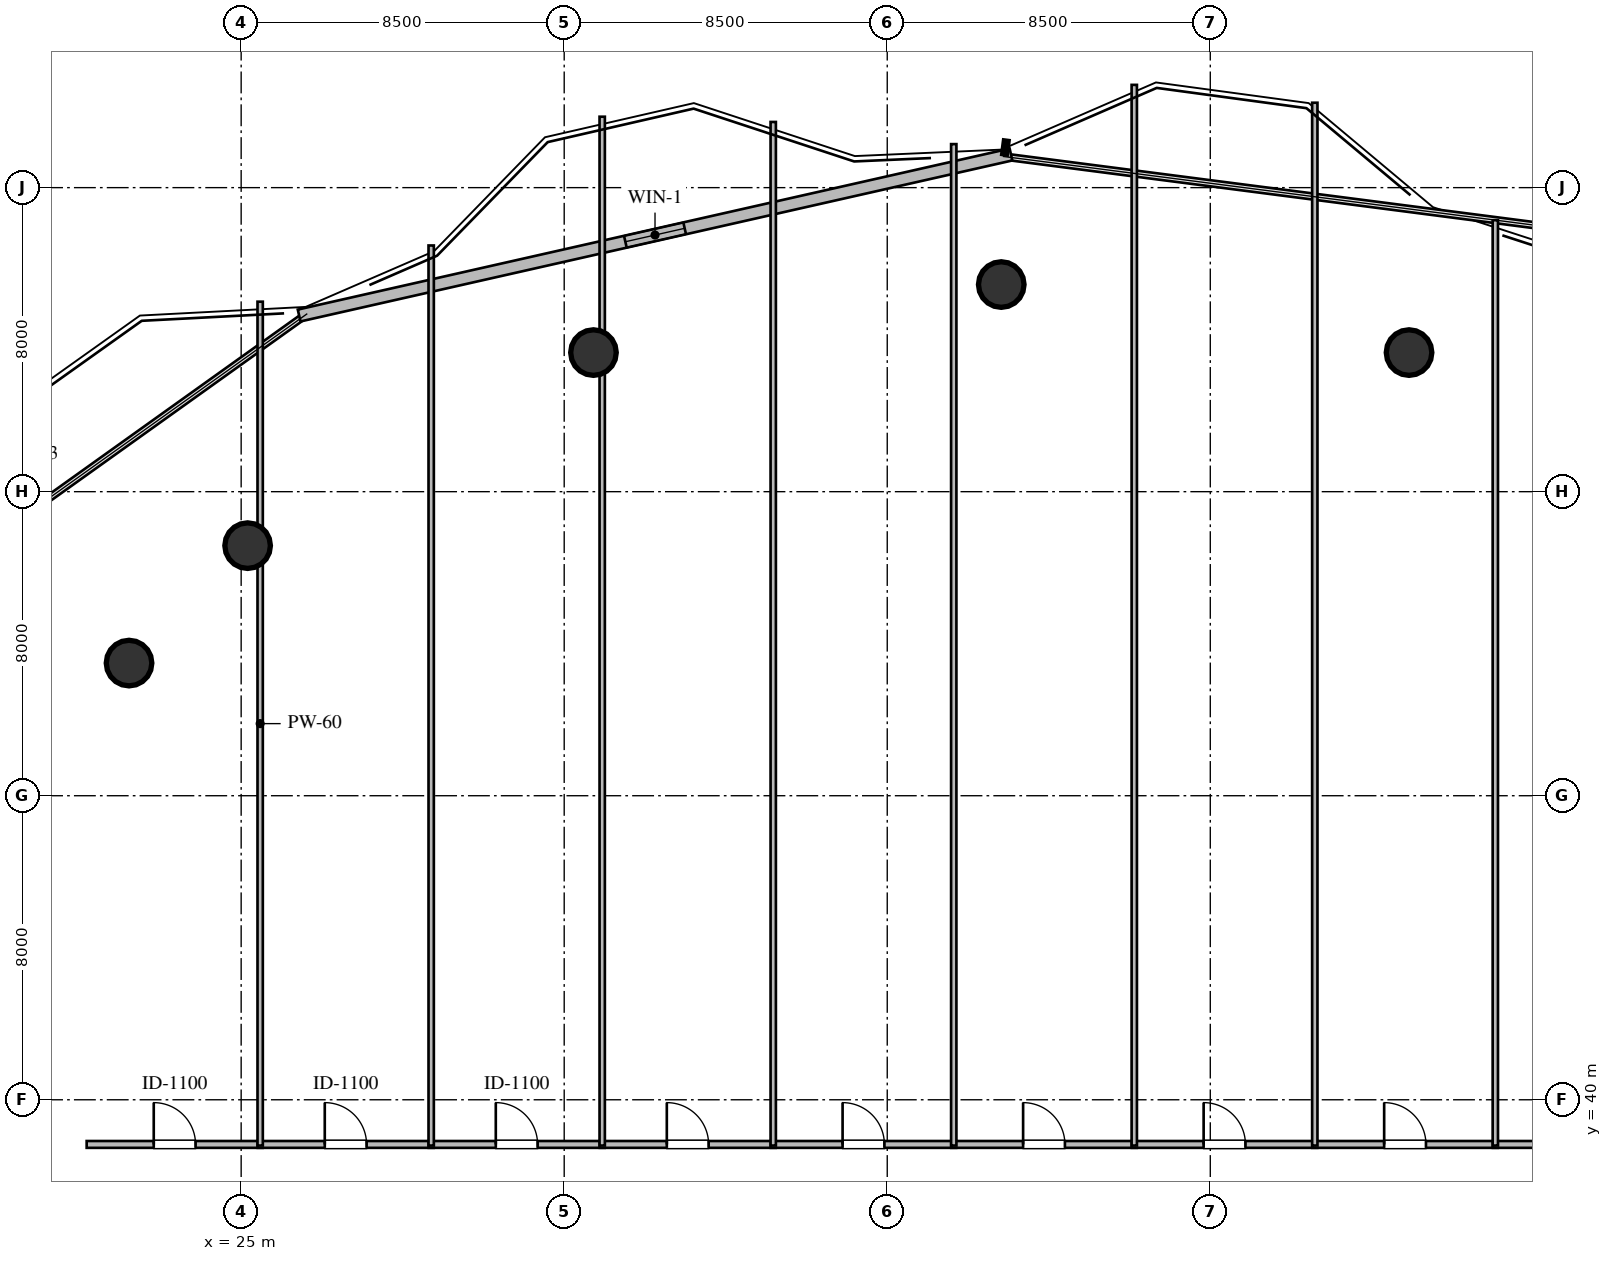
"""IFC4 building model, lengths in metres.
Left out: names, types, materials, properties, quantities, classifications, styles, units other than length and angle.
Written with IfcOpenShell. Run it as: python <this file> out.ifc"""

import sys

from ifc_helpers import new_model, si_unit, direction, frame, frame_2d, origin, origin_2d, place, context, subcontext, project, spatial, rectangle, circle, extrude, element, fill, save


model = new_model("IFC4")
c1 = context("Model", 3, precision=1e-05, world=origin(), true_north=direction((0.0, 1.0)))
c2 = subcontext(c1, "Body", "Model", "MODEL_VIEW")
j1 = project(units=[si_unit("LENGTHUNIT", "METRE"), si_unit("PLANEANGLEUNIT", "RADIAN")], contexts=[c1])
p1 = place(None, origin())
s1 = spatial("IfcSite", under=j1, at=p1, CompositionType="ELEMENT")
p2 = place(p1, origin())
s2 = spatial("IfcBuilding", under=s1, at=p2, CompositionType="ELEMENT")
p3 = place(p2, frame((0.0, 0.0, 178.2)))
s3 = spatial("IfcBuildingStorey", under=s2, at=p3, CompositionType="ELEMENT", Elevation=178.2)
for number, where, z_axis, x_axis in (
    (1, (55.73, 59.66, 0.0), (0.0, 0.0, 1.0), (1.0, 0.0, 0.0)),
    (2, (45.0, 61.45, 0.0), (0.0, 0.0, 1.0), (1.0, 0.0, 0.0)),
    (3, (34.27, 59.66, 0.0), (0.0, 0.0, 1.0), (1.0, 0.0, 0.0)),
    (4, (25.17, 54.58, 0.0), (0.0, 0.0, 1.0), (1.0, 0.0, 0.0)),
    (5, (22.05, 51.49, 0.0), (0.0, 0.0, 1.0), (1.0, 0.0, 0.0)),
):
    element("IfcColumn", number, at=place(p3, frame(where, z_axis=z_axis, x_axis=x_axis)), inside=s3, PredefinedType="COLUMN", context=c2, shape_type="SweptSolid", body=[
        extrude(circle(Radius=0.6, at=origin_2d()), origin(), (0.0, 0.0, 1.0), 3.6),
    ])
p4 = place(p3, frame((26.525, 60.635, 0.0), z_axis=(0.0, 0.0, 1.0), x_axis=(0.975368700272, 0.220580820855, 0.0)))
e6 = element("IfcWall", 6, at=p4, inside=s3, PredefinedType="STANDARD", context=c2, shape_type="SweptSolid", body=[
    extrude(rectangle(XDim=19.204, YDim=0.32, at=frame_2d((9.602, 0.0))), origin(), (0.0, 0.0, 1.0), 3.28),
])
p5 = place(p4, frame((8.801, 0.0, 1.05)))
e7 = element("IfcOpeningElement", 7, at=p5, cuts=e6, PredefinedType="OPENING", context=c2, shape_type="SweptSolid", body=[
    extrude(rectangle(XDim=1.6, YDim=1.5, at=frame_2d((0.8, 0.75))), frame((0.0, 0.17, 0.0), z_axis=(0.0, -1.0, 0.0), x_axis=(1.0, 0.0, 0.0)), (0.0, 0.0, 1.0), 0.34),
])
p6 = place(p3, frame((20.935, 38.825, 0.0), z_axis=(0.0, 0.0, 1.0), x_axis=(1.0, 0.0, 0.0)))
e8 = element("IfcWall", 8, at=p6, inside=s3, PredefinedType="PARTITIONING", context=c2, shape_type="SweptSolid", body=[
    extrude(rectangle(XDim=4.63, YDim=0.18, at=frame_2d((2.315, 0.0))), origin(), (0.0, 0.0, 1.0), 3.28),
])
p7 = place(p6, frame((1.765, 0.0, 0.0)))
e9 = element("IfcOpeningElement", 9, at=p7, cuts=e8, PredefinedType="OPENING", context=c2, shape_type="SweptSolid", body=[
    extrude(rectangle(XDim=1.1, YDim=2.1, at=frame_2d((0.55, 1.05))), frame((0.0, 0.1, 0.0), z_axis=(0.0, -1.0, 0.0), x_axis=(1.0, 0.0, 0.0)), (0.0, 0.0, 1.0), 0.2),
])
p8 = place(p3, frame((25.435, 38.825, 0.0), z_axis=(0.0, 0.0, 1.0), x_axis=(1.0, 0.0, 0.0)))
e10 = element("IfcWall", 10, at=p8, inside=s3, PredefinedType="PARTITIONING", context=c2, shape_type="SweptSolid", body=[
    extrude(rectangle(XDim=4.63, YDim=0.18, at=frame_2d((2.315, 0.0))), origin(), (0.0, 0.0, 1.0), 3.28),
])
p9 = place(p8, frame((1.765, 0.0, 0.0)))
e11 = element("IfcOpeningElement", 11, at=p9, cuts=e10, PredefinedType="OPENING", context=c2, shape_type="SweptSolid", body=[
    extrude(rectangle(XDim=1.1, YDim=2.1, at=frame_2d((0.55, 1.05))), frame((0.0, 0.1, 0.0), z_axis=(0.0, -1.0, 0.0), x_axis=(1.0, 0.0, 0.0)), (0.0, 0.0, 1.0), 0.2),
])
p10 = place(p3, frame((29.935, 38.825, 0.0), z_axis=(0.0, 0.0, 1.0), x_axis=(1.0, 0.0, 0.0)))
e12 = element("IfcWall", 12, at=p10, inside=s3, PredefinedType="PARTITIONING", context=c2, shape_type="SweptSolid", body=[
    extrude(rectangle(XDim=4.63, YDim=0.18, at=frame_2d((2.315, 0.0))), origin(), (0.0, 0.0, 1.0), 3.28),
])
p11 = place(p10, frame((1.765, 0.0, 0.0)))
e13 = element("IfcOpeningElement", 13, at=p11, cuts=e12, PredefinedType="OPENING", context=c2, shape_type="SweptSolid", body=[
    extrude(rectangle(XDim=1.1, YDim=2.1, at=frame_2d((0.55, 1.05))), frame((0.0, 0.1, 0.0), z_axis=(0.0, -1.0, 0.0), x_axis=(1.0, 0.0, 0.0)), (0.0, 0.0, 1.0), 0.2),
])
p12 = place(p3, frame((34.435, 38.825, 0.0), z_axis=(0.0, 0.0, 1.0), x_axis=(1.0, 0.0, 0.0)))
e14 = element("IfcWall", 14, at=p12, inside=s3, PredefinedType="PARTITIONING", context=c2, shape_type="SweptSolid", body=[
    extrude(rectangle(XDim=4.63, YDim=0.18, at=frame_2d((2.315, 0.0))), origin(), (0.0, 0.0, 1.0), 3.28),
])
p13 = place(p12, frame((1.765, 0.0, 0.0)))
e15 = element("IfcOpeningElement", 15, at=p13, cuts=e14, PredefinedType="OPENING", context=c2, shape_type="SweptSolid", body=[
    extrude(rectangle(XDim=1.1, YDim=2.1, at=frame_2d((0.55, 1.05))), frame((0.0, 0.1, 0.0), z_axis=(0.0, -1.0, 0.0), x_axis=(1.0, 0.0, 0.0)), (0.0, 0.0, 1.0), 0.2),
])
p14 = place(p3, frame((38.935, 38.825, 0.0), z_axis=(0.0, 0.0, 1.0), x_axis=(1.0, 0.0, 0.0)))
e16 = element("IfcWall", 16, at=p14, inside=s3, PredefinedType="PARTITIONING", context=c2, shape_type="SweptSolid", body=[
    extrude(rectangle(XDim=4.88, YDim=0.18, at=frame_2d((2.44, 0.0))), origin(), (0.0, 0.0, 1.0), 3.28),
])
p15 = place(p14, frame((1.89, 0.0, 0.0)))
e17 = element("IfcOpeningElement", 17, at=p15, cuts=e16, PredefinedType="OPENING", context=c2, shape_type="SweptSolid", body=[
    extrude(rectangle(XDim=1.1, YDim=2.1, at=frame_2d((0.55, 1.05))), frame((0.0, 0.1, 0.0), z_axis=(0.0, -1.0, 0.0), x_axis=(1.0, 0.0, 0.0)), (0.0, 0.0, 1.0), 0.2),
])
p16 = place(p3, frame((43.685, 38.825, 0.0), z_axis=(0.0, 0.0, 1.0), x_axis=(1.0, 0.0, 0.0)))
e18 = element("IfcWall", 18, at=p16, inside=s3, PredefinedType="PARTITIONING", context=c2, shape_type="SweptSolid", body=[
    extrude(rectangle(XDim=4.88, YDim=0.18, at=frame_2d((2.44, 0.0))), origin(), (0.0, 0.0, 1.0), 3.28),
])
p17 = place(p16, frame((1.89, 0.0, 0.0)))
e19 = element("IfcOpeningElement", 19, at=p17, cuts=e18, PredefinedType="OPENING", context=c2, shape_type="SweptSolid", body=[
    extrude(rectangle(XDim=1.1, YDim=2.1, at=frame_2d((0.55, 1.05))), frame((0.0, 0.1, 0.0), z_axis=(0.0, -1.0, 0.0), x_axis=(1.0, 0.0, 0.0)), (0.0, 0.0, 1.0), 0.2),
])
p18 = place(p3, frame((48.435, 38.825, 0.0), z_axis=(0.0, 0.0, 1.0), x_axis=(1.0, 0.0, 0.0)))
e20 = element("IfcWall", 20, at=p18, inside=s3, PredefinedType="PARTITIONING", context=c2, shape_type="SweptSolid", body=[
    extrude(rectangle(XDim=4.88, YDim=0.18, at=frame_2d((2.44, 0.0))), origin(), (0.0, 0.0, 1.0), 3.28),
])
p19 = place(p18, frame((1.89, 0.0, 0.0)))
e21 = element("IfcOpeningElement", 21, at=p19, cuts=e20, PredefinedType="OPENING", context=c2, shape_type="SweptSolid", body=[
    extrude(rectangle(XDim=1.1, YDim=2.1, at=frame_2d((0.55, 1.05))), frame((0.0, 0.1, 0.0), z_axis=(0.0, -1.0, 0.0), x_axis=(1.0, 0.0, 0.0)), (0.0, 0.0, 1.0), 0.2),
])
p20 = place(p3, frame((53.185, 38.825, 0.0), z_axis=(0.0, 0.0, 1.0), x_axis=(1.0, 0.0, 0.0)))
e22 = element("IfcWall", 22, at=p20, inside=s3, PredefinedType="PARTITIONING", context=c2, shape_type="SweptSolid", body=[
    extrude(rectangle(XDim=4.88, YDim=0.18, at=frame_2d((2.44, 0.0))), origin(), (0.0, 0.0, 1.0), 3.28),
])
p21 = place(p20, frame((1.89, 0.0, 0.0)))
e23 = element("IfcOpeningElement", 23, at=p21, cuts=e22, PredefinedType="OPENING", context=c2, shape_type="SweptSolid", body=[
    extrude(rectangle(XDim=1.1, YDim=2.1, at=frame_2d((0.55, 1.05))), frame((0.0, 0.1, 0.0), z_axis=(0.0, -1.0, 0.0), x_axis=(1.0, 0.0, 0.0)), (0.0, 0.0, 1.0), 0.2),
])
p22 = place(p3, frame((57.935, 38.825, 0.0), z_axis=(0.0, 0.0, 1.0), x_axis=(1.0, 0.0, 0.0)))
e24 = element("IfcWall", 24, at=p22, inside=s3, PredefinedType="PARTITIONING", context=c2, shape_type="SweptSolid", body=[
    extrude(rectangle(XDim=10.595, YDim=0.18, at=frame_2d((5.297, 0.0))), origin(), (0.0, 0.0, 1.0), 3.28),
])
p23 = place(p22, frame((4.748, 0.0, 0.0)))
e25 = element("IfcOpeningElement", 25, at=p23, cuts=e24, PredefinedType="OPENING", context=c2, shape_type="SweptSolid", body=[
    extrude(rectangle(XDim=1.1, YDim=2.1, at=frame_2d((0.55, 1.05))), frame((0.0, 0.1, 0.0), z_axis=(0.0, -1.0, 0.0), x_axis=(1.0, 0.0, 0.0)), (0.0, 0.0, 1.0), 0.2),
])
p24 = place(p3, frame((25.5, 60.999, 0.0), z_axis=(0.0, 0.0, 1.0), x_axis=(0.0, -1.0, 0.0)))
e26 = element("IfcWall", 26, at=p24, inside=s3, PredefinedType="PARTITIONING", context=c2, shape_type="SweptSolid", body=[
    extrude(rectangle(XDim=22.204, YDim=0.14, at=frame_2d((11.102, 0.0))), origin(), (0.0, 0.0, 1.0), 2.81),
])
p25 = place(p3, frame((30.0, 62.478, 0.0), z_axis=(0.0, 0.0, 1.0), x_axis=(0.0, -1.0, 0.0)))
e27 = element("IfcWall", 27, at=p25, inside=s3, PredefinedType="PARTITIONING", context=c2, shape_type="SweptSolid", body=[
    extrude(rectangle(XDim=23.683, YDim=0.14, at=frame_2d((11.842, 0.0))), origin(), (0.0, 0.0, 1.0), 3.28),
])
p26 = place(p3, frame((34.5, 65.866, 0.0), z_axis=(0.0, 0.0, 1.0), x_axis=(0.0, -1.0, 0.0)))
e28 = element("IfcWall", 28, at=p26, inside=s3, PredefinedType="PARTITIONING", context=c2, shape_type="SweptSolid", body=[
    extrude(rectangle(XDim=27.071, YDim=0.14, at=frame_2d((13.536, 0.0))), origin(), (0.0, 0.0, 1.0), 2.81),
])
p27 = place(p3, frame((39.0, 65.728, 0.0), z_axis=(0.0, 0.0, 1.0), x_axis=(0.0, -1.0, 0.0)))
e29 = element("IfcWall", 29, at=p27, inside=s3, PredefinedType="PARTITIONING", context=c2, shape_type="SweptSolid", body=[
    extrude(rectangle(XDim=26.933, YDim=0.14, at=frame_2d((13.467, 0.0))), origin(), (0.0, 0.0, 1.0), 3.28),
])
p28 = place(p3, frame((43.75, 65.145, 0.0), z_axis=(0.0, 0.0, 1.0), x_axis=(0.0, -1.0, 0.0)))
e30 = element("IfcWall", 30, at=p28, inside=s3, PredefinedType="PARTITIONING", context=c2, shape_type="SweptSolid", body=[
    extrude(rectangle(XDim=26.35, YDim=0.14, at=frame_2d((13.175, 0.0))), origin(), (0.0, 0.0, 1.0), 2.81),
])
p29 = place(p3, frame((48.5, 66.704, 0.0), z_axis=(0.0, 0.0, 1.0), x_axis=(0.0, -1.0, 0.0)))
e31 = element("IfcWall", 31, at=p29, inside=s3, PredefinedType="PARTITIONING", context=c2, shape_type="SweptSolid", body=[
    extrude(rectangle(XDim=27.909, YDim=0.14, at=frame_2d((13.955, 0.0))), origin(), (0.0, 0.0, 1.0), 3.28),
])
p30 = place(p3, frame((53.25, 66.234, 0.0), z_axis=(0.0, 0.0, 1.0), x_axis=(0.0, -1.0, 0.0)))
e32 = element("IfcWall", 32, at=p30, inside=s3, PredefinedType="PARTITIONING", context=c2, shape_type="SweptSolid", body=[
    extrude(rectangle(XDim=27.439, YDim=0.14, at=frame_2d((13.719, 0.0))), origin(), (0.0, 0.0, 1.0), 3.28),
])
p31 = place(p3, frame((58.0, 63.143, 0.0), z_axis=(0.0, 0.0, 1.0), x_axis=(0.0, -1.0, 0.0)))
e33 = element("IfcWall", 33, at=p31, inside=s3, PredefinedType="PARTITIONING", context=c2, shape_type="SweptSolid", body=[
    extrude(rectangle(XDim=24.348, YDim=0.14, at=frame_2d((12.174, 0.0))), origin(), (0.0, 0.0, 1.0), 3.28),
])
p32 = place(p5, origin())
e34 = element("IfcWindow", 34, at=p32, inside=s3, PartitioningType="SINGLE_PANEL", PredefinedType="WINDOW", context=c2, shape_type="SweptSolid", body=[
    extrude(rectangle(XDim=1.6, YDim=1.5, at=frame_2d((0.8, 0.75))), frame((0.0, 0.03, 0.0), z_axis=(0.0, -1.0, 0.0), x_axis=(1.0, 0.0, 0.0)), (0.0, 0.0, 1.0), 0.06),
])
fill(e7, e34)
p33 = place(p7, origin())
e35 = element("IfcDoor", 35, at=p33, inside=s3, OperationType="SINGLE_SWING_LEFT", PredefinedType="DOOR", context=c2, shape_type="SweptSolid", body=[
    extrude(rectangle(XDim=1.1, YDim=2.1, at=frame_2d((0.55, 1.05))), frame((0.0, 0.025, 0.0), z_axis=(0.0, -1.0, 0.0), x_axis=(1.0, 0.0, 0.0)), (0.0, 0.0, 1.0), 0.05),
])
fill(e9, e35)
p34 = place(p9, origin())
e36 = element("IfcDoor", 36, at=p34, inside=s3, OperationType="SINGLE_SWING_LEFT", PredefinedType="DOOR", context=c2, shape_type="SweptSolid", body=[
    extrude(rectangle(XDim=1.1, YDim=2.1, at=frame_2d((0.55, 1.05))), frame((0.0, 0.025, 0.0), z_axis=(0.0, -1.0, 0.0), x_axis=(1.0, 0.0, 0.0)), (0.0, 0.0, 1.0), 0.05),
])
fill(e11, e36)
p35 = place(p11, origin())
e37 = element("IfcDoor", 37, at=p35, inside=s3, OperationType="SINGLE_SWING_LEFT", PredefinedType="DOOR", context=c2, shape_type="SweptSolid", body=[
    extrude(rectangle(XDim=1.1, YDim=2.1, at=frame_2d((0.55, 1.05))), frame((0.0, 0.025, 0.0), z_axis=(0.0, -1.0, 0.0), x_axis=(1.0, 0.0, 0.0)), (0.0, 0.0, 1.0), 0.05),
])
fill(e13, e37)
p36 = place(p13, origin())
e38 = element("IfcDoor", 38, at=p36, inside=s3, OperationType="SINGLE_SWING_LEFT", PredefinedType="DOOR", context=c2, shape_type="SweptSolid", body=[
    extrude(rectangle(XDim=1.1, YDim=2.1, at=frame_2d((0.55, 1.05))), frame((0.0, 0.025, 0.0), z_axis=(0.0, -1.0, 0.0), x_axis=(1.0, 0.0, 0.0)), (0.0, 0.0, 1.0), 0.05),
])
fill(e15, e38)
p37 = place(p15, origin())
e39 = element("IfcDoor", 39, at=p37, inside=s3, OperationType="SINGLE_SWING_LEFT", PredefinedType="DOOR", context=c2, shape_type="SweptSolid", body=[
    extrude(rectangle(XDim=1.1, YDim=2.1, at=frame_2d((0.55, 1.05))), frame((0.0, 0.025, 0.0), z_axis=(0.0, -1.0, 0.0), x_axis=(1.0, 0.0, 0.0)), (0.0, 0.0, 1.0), 0.05),
])
fill(e17, e39)
p38 = place(p17, origin())
e40 = element("IfcDoor", 40, at=p38, inside=s3, OperationType="SINGLE_SWING_LEFT", PredefinedType="DOOR", context=c2, shape_type="SweptSolid", body=[
    extrude(rectangle(XDim=1.1, YDim=2.1, at=frame_2d((0.55, 1.05))), frame((0.0, 0.025, 0.0), z_axis=(0.0, -1.0, 0.0), x_axis=(1.0, 0.0, 0.0)), (0.0, 0.0, 1.0), 0.05),
])
fill(e19, e40)
p39 = place(p19, origin())
e41 = element("IfcDoor", 41, at=p39, inside=s3, OperationType="SINGLE_SWING_LEFT", PredefinedType="DOOR", context=c2, shape_type="SweptSolid", body=[
    extrude(rectangle(XDim=1.1, YDim=2.1, at=frame_2d((0.55, 1.05))), frame((0.0, 0.025, 0.0), z_axis=(0.0, -1.0, 0.0), x_axis=(1.0, 0.0, 0.0)), (0.0, 0.0, 1.0), 0.05),
])
fill(e21, e41)
p40 = place(p21, origin())
e42 = element("IfcDoor", 42, at=p40, inside=s3, OperationType="SINGLE_SWING_LEFT", PredefinedType="DOOR", context=c2, shape_type="SweptSolid", body=[
    extrude(rectangle(XDim=1.1, YDim=2.1, at=frame_2d((0.55, 1.05))), frame((0.0, 0.025, 0.0), z_axis=(0.0, -1.0, 0.0), x_axis=(1.0, 0.0, 0.0)), (0.0, 0.0, 1.0), 0.05),
])
fill(e23, e42)
save(model, sys.argv[1])
